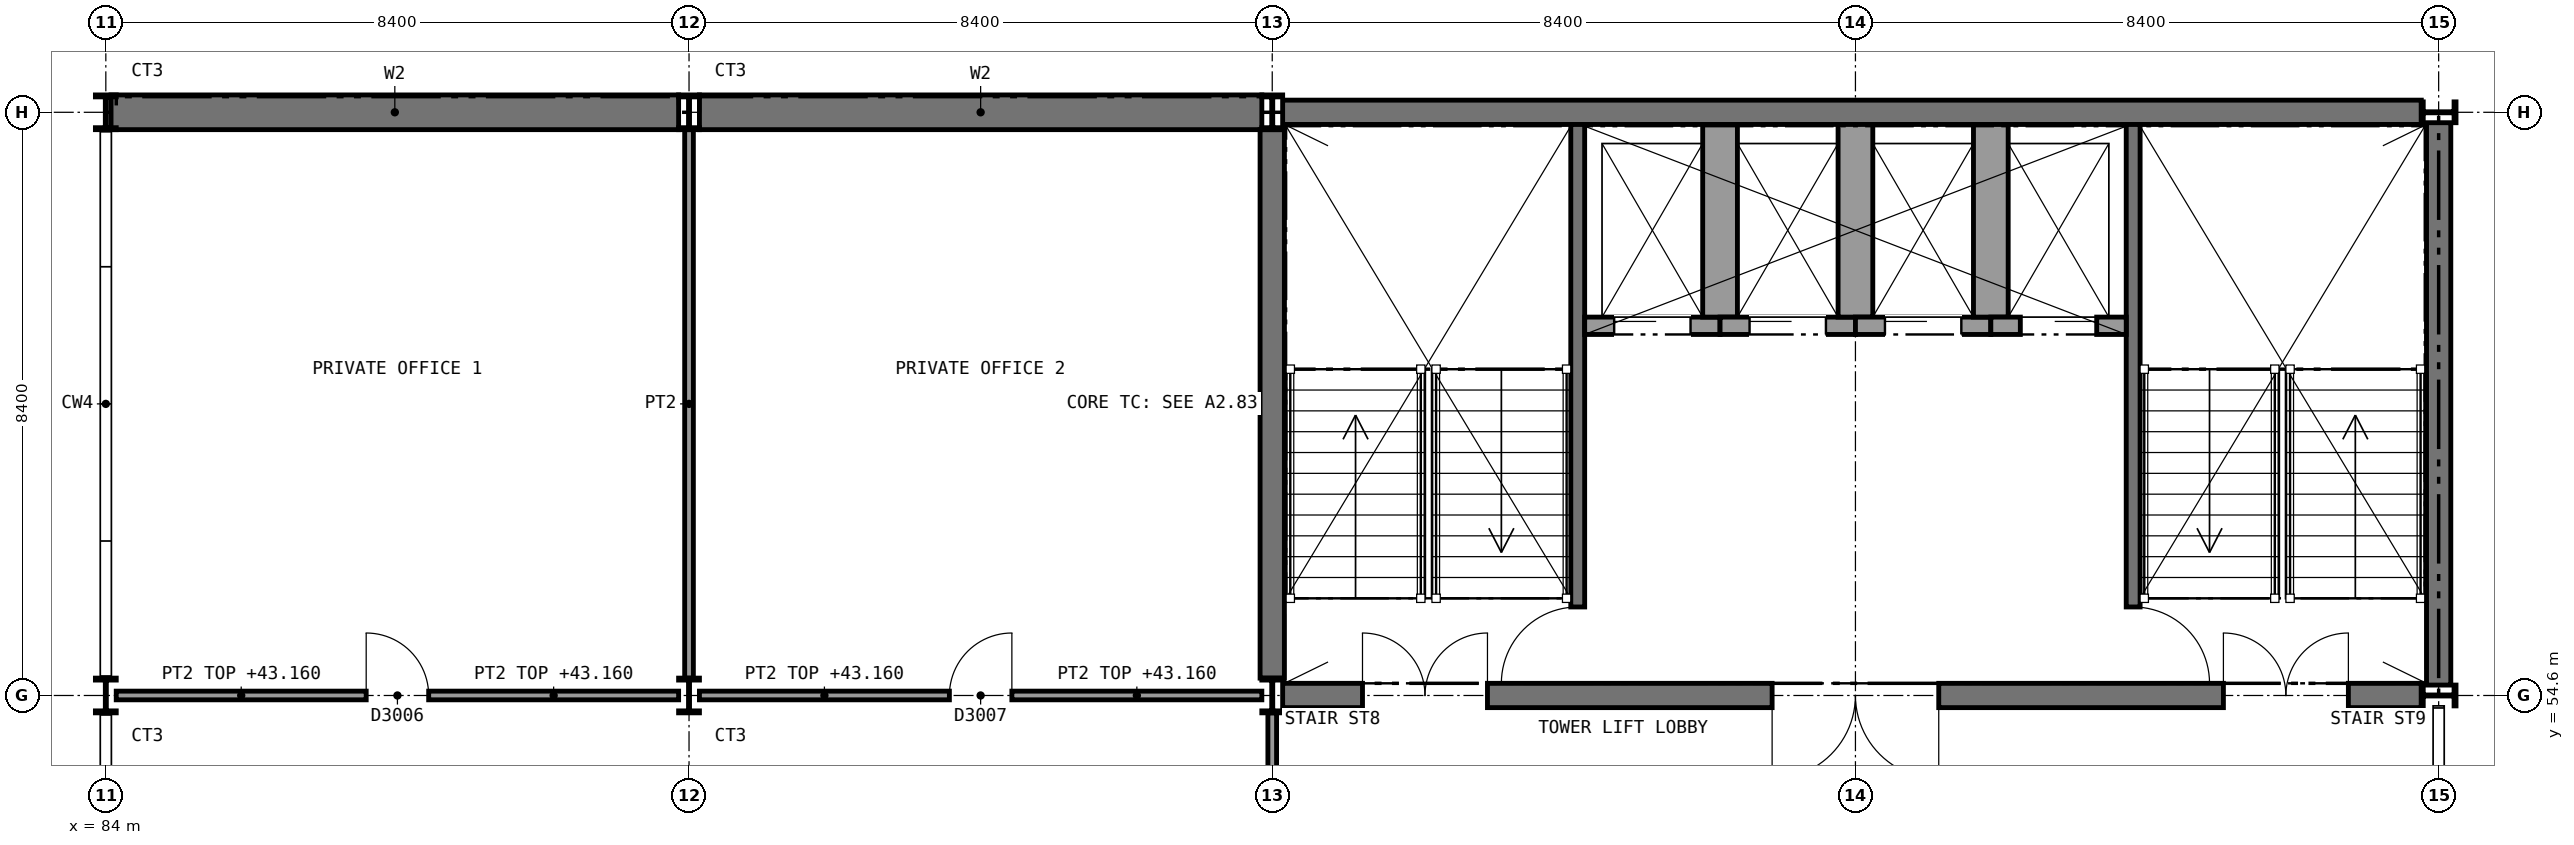
"""IFC4 building model, lengths in metres.
Left out: names, types, materials, properties, quantities, classifications, styles, units other than length and angle.
Written with IfcOpenShell. Run it as: python <this file> out.ifc"""

import sys

from ifc_helpers import new_model, si_unit, direction, frame, frame_2d, origin, origin_2d, place, context, subcontext, project, spatial, rectangle, i_section, extrude, element, fill, save


model = new_model("IFC4")
c1 = context("Model", 3, precision=1e-05, world=origin(), true_north=direction((0.0, 1.0)))
c2 = subcontext(c1, "Body", "Model", "MODEL_VIEW")
j1 = project(units=[si_unit("LENGTHUNIT", "METRE"), si_unit("PLANEANGLEUNIT", "RADIAN")], contexts=[c1])
p1 = place(None, origin())
s1 = spatial("IfcSite", under=j1, at=p1, CompositionType="ELEMENT")
p2 = place(p1, origin())
s2 = spatial("IfcBuilding", under=s1, at=p2, CompositionType="ELEMENT")
p3 = place(p2, frame((0.0, 0.0, 39.6)))
s3 = spatial("IfcBuildingStorey", under=s2, at=p3, CompositionType="ELEMENT", Elevation=39.6)
p4 = place(p3, frame((84.075, 63.0, 0.0), z_axis=(0.0, 0.0, 1.0), x_axis=(1.0, 0.0, 0.0)))
e1 = element("IfcWall", 1, at=p4, inside=s3, PredefinedType="SHEAR", context=c2, shape_type="SweptSolid", body=[
    extrude(rectangle(XDim=8.175, YDim=0.5, at=frame_2d((4.087, 0.0))), origin(), (0.0, 0.0, 1.0), 3.85),
])
p5 = place(p3, frame((92.55, 63.0, 0.0), z_axis=(0.0, 0.0, 1.0), x_axis=(1.0, 0.0, 0.0)))
e2 = element("IfcWall", 2, at=p5, inside=s3, PredefinedType="SHEAR", context=c2, shape_type="SweptSolid", body=[
    extrude(rectangle(XDim=8.1, YDim=0.5, at=frame_2d((4.05, 0.0))), origin(), (0.0, 0.0, 1.0), 3.85),
])
p6 = place(p3, frame((100.95, 63.0, 0.0), z_axis=(0.0, 0.0, 1.0), x_axis=(1.0, 0.0, 0.0)))
e3 = element("IfcWall", 3, at=p6, inside=s3, PredefinedType="SHEAR", context=c2, shape_type="SweptSolid", body=[
    extrude(rectangle(XDim=16.4, YDim=0.35, at=frame_2d((8.2, 0.0))), origin(), (0.0, 0.0, 1.0), 3.85),
])
p7 = place(p3, frame((100.95, 54.6, 0.0), z_axis=(0.0, 0.0, 1.0), x_axis=(1.0, 0.0, 0.0)))
e4 = element("IfcWall", 4, at=p7, inside=s3, PredefinedType="SHEAR", context=c2, shape_type="SweptSolid", body=[
    extrude(rectangle(XDim=16.4, YDim=0.35, at=frame_2d((8.2, 0.0))), origin(), (0.0, 0.0, 1.0), 3.85),
])
p8 = place(p7, frame((1.15, 0.0, 0.0)))
e5 = element("IfcOpeningElement", 5, at=p8, cuts=e4, PredefinedType="OPENING", context=c2, shape_type="SweptSolid", body=[
    extrude(rectangle(XDim=1.8, YDim=2.1, at=frame_2d((0.9, 1.05))), frame((0.0, 0.185, 0.0), z_axis=(0.0, -1.0, 0.0), x_axis=(1.0, 0.0, 0.0)), (0.0, 0.0, 1.0), 0.37),
])
p9 = place(p7, frame((13.55, 0.0, 0.0)))
e6 = element("IfcOpeningElement", 6, at=p9, cuts=e4, PredefinedType="OPENING", context=c2, shape_type="SweptSolid", body=[
    extrude(rectangle(XDim=1.8, YDim=2.1, at=frame_2d((0.9, 1.05))), frame((0.0, 0.185, 0.0), z_axis=(0.0, -1.0, 0.0), x_axis=(1.0, 0.0, 0.0)), (0.0, 0.0, 1.0), 0.37),
])
p10 = place(p7, frame((7.05, 0.0, 0.0)))
e7 = element("IfcOpeningElement", 7, at=p10, cuts=e4, PredefinedType="OPENING", context=c2, shape_type="SweptSolid", body=[
    extrude(rectangle(XDim=2.4, YDim=2.4, at=frame_2d((1.2, 1.2))), frame((0.0, 0.185, 0.0), z_axis=(0.0, -1.0, 0.0), x_axis=(1.0, 0.0, 0.0)), (0.0, 0.0, 1.0), 0.37),
])
p11 = place(p3, frame((100.8, 54.85, 0.0), z_axis=(0.0, 0.0, 1.0), x_axis=(0.0, 1.0, 0.0)))
e8 = element("IfcWall", 8, at=p11, inside=s3, PredefinedType="SHEAR", context=c2, shape_type="SweptSolid", body=[
    extrude(rectangle(XDim=7.9, YDim=0.35, at=frame_2d((3.95, 0.0))), origin(), (0.0, 0.0, 1.0), 3.85),
])
p12 = place(p3, frame((117.6, 54.75, 0.0), z_axis=(0.0, 0.0, 1.0), x_axis=(0.0, 1.0, 0.0)))
e9 = element("IfcWall", 9, at=p12, inside=s3, PredefinedType="SHEAR", context=c2, shape_type="SweptSolid", body=[
    extrude(rectangle(XDim=8.1, YDim=0.35, at=frame_2d((4.05, 0.0))), origin(), (0.0, 0.0, 1.0), 3.85),
])
for number, where, z_axis, x_axis in (
    (10, (84.0, 54.6, 0.0), (0.0, 0.0, 1.0), (1.0, 0.0, 0.0)),
    (11, (84.0, 63.0, 0.0), (0.0, 0.0, 1.0), (1.0, 0.0, 0.0)),
    (12, (92.4, 54.6, 0.0), (0.0, 0.0, 1.0), (1.0, 0.0, 0.0)),
    (13, (92.4, 63.0, 0.0), (0.0, 0.0, 1.0), (1.0, 0.0, 0.0)),
    (14, (100.8, 54.6, 0.0), (0.0, 0.0, 1.0), (1.0, 0.0, 0.0)),
    (15, (100.8, 63.0, 0.0), (0.0, 0.0, 1.0), (1.0, 0.0, 0.0)),
    (16, (117.6, 54.6, 0.0), (0.0, 0.0, 1.0), (0.0, 1.0, 0.0)),
    (17, (117.6, 63.0, 0.0), (0.0, 0.0, 1.0), (0.0, 1.0, 0.0)),
):
    element("IfcColumn", number, at=place(p3, frame(where, z_axis=z_axis, x_axis=x_axis)), inside=s3, PredefinedType="COLUMN", context=c2, shape_type="SweptSolid", body=[
        extrude(i_section(OverallWidth=0.3, OverallDepth=0.5, WebThickness=0.014, FlangeThickness=0.028, FilletRadius=0.027, at=origin_2d()), origin(), (0.0, 0.0, 1.0), 4.0),
    ])
p13 = place(p3, frame((100.8, 51.35, 0.0), z_axis=(0.0, 0.0, 1.0), x_axis=(0.0, 1.0, 0.0)))
e18 = element("IfcWall", 18, at=p13, inside=s3, PredefinedType="PARTITIONING", context=c2, shape_type="SweptSolid", body=[
    extrude(rectangle(XDim=3.0, YDim=0.125, at=frame_2d((1.5, 0.0))), origin(), (0.0, 0.0, 1.0), 3.5),
])
p14 = place(p3, frame((84.15, 54.6, 0.0), z_axis=(0.0, 0.0, 1.0), x_axis=(1.0, 0.0, 0.0)))
e19 = element("IfcWall", 19, at=p14, inside=s3, PredefinedType="PARTITIONING", context=c2, shape_type="SweptSolid", body=[
    extrude(rectangle(XDim=8.1, YDim=0.125, at=frame_2d((4.05, 0.0))), origin(), (0.0, 0.0, 1.0), 3.56),
])
p15 = place(p14, frame((3.6, 0.0, 0.0)))
e20 = element("IfcOpeningElement", 20, at=p15, cuts=e19, PredefinedType="OPENING", context=c2, shape_type="SweptSolid", body=[
    extrude(rectangle(XDim=0.9, YDim=2.1, at=frame_2d((0.45, 1.05))), frame((0.0, 0.073, 0.0), z_axis=(0.0, -1.0, 0.0), x_axis=(1.0, 0.0, 0.0)), (0.0, 0.0, 1.0), 0.145),
])
p16 = place(p3, frame((92.55, 54.6, 0.0), z_axis=(0.0, 0.0, 1.0), x_axis=(1.0, 0.0, 0.0)))
e21 = element("IfcWall", 21, at=p16, inside=s3, PredefinedType="PARTITIONING", context=c2, shape_type="SweptSolid", body=[
    extrude(rectangle(XDim=8.1, YDim=0.125, at=frame_2d((4.05, 0.0))), origin(), (0.0, 0.0, 1.0), 3.56),
])
p17 = place(p16, frame((3.6, 0.0, 0.0)))
e22 = element("IfcOpeningElement", 22, at=p17, cuts=e21, PredefinedType="OPENING", context=c2, shape_type="SweptSolid", body=[
    extrude(rectangle(XDim=0.9, YDim=2.1, at=frame_2d((0.45, 1.05))), frame((0.0, 0.073, 0.0), z_axis=(0.0, -1.0, 0.0), x_axis=(1.0, 0.0, 0.0)), (0.0, 0.0, 1.0), 0.145),
])
p18 = place(p3, frame((92.4, 54.85, 0.0), z_axis=(0.0, 0.0, 1.0), x_axis=(0.0, 1.0, 0.0)))
e23 = element("IfcWall", 23, at=p18, inside=s3, PredefinedType="PARTITIONING", context=c2, shape_type="SweptSolid", body=[
    extrude(rectangle(XDim=7.9, YDim=0.125, at=frame_2d((3.95, 0.0))), origin(), (0.0, 0.0, 1.0), 3.5),
])
p19 = place(p3, frame((105.2, 62.825, 0.0), z_axis=(0.0, 0.0, 1.0), x_axis=(0.0, -1.0, 0.0)))
e24 = element("IfcWall", 24, at=p19, inside=s3, PredefinedType="SHEAR", context=c2, shape_type="SweptSolid", body=[
    extrude(rectangle(XDim=8.05, YDim=0.2, at=frame_2d((4.025, 0.0))), origin(), (0.0, 0.0, 1.0), 3.85),
])
p20 = place(p19, frame((6.95, 0.0, 0.0)))
e25 = element("IfcOpeningElement", 25, at=p20, cuts=e24, PredefinedType="OPENING", context=c2, shape_type="SweptSolid", body=[
    extrude(rectangle(XDim=1.11, YDim=2.1, at=frame_2d((0.555, 1.05))), frame((0.0, 0.11, 0.0), z_axis=(0.0, -1.0, 0.0), x_axis=(1.0, 0.0, 0.0)), (0.0, 0.0, 1.0), 0.22),
])
p21 = place(p3, frame((113.2, 62.825, 0.0), z_axis=(0.0, 0.0, 1.0), x_axis=(0.0, -1.0, 0.0)))
e26 = element("IfcWall", 26, at=p21, inside=s3, PredefinedType="SHEAR", context=c2, shape_type="SweptSolid", body=[
    extrude(rectangle(XDim=8.05, YDim=0.2, at=frame_2d((4.025, 0.0))), origin(), (0.0, 0.0, 1.0), 3.85),
])
p22 = place(p21, frame((6.95, 0.0, 0.0)))
e27 = element("IfcOpeningElement", 27, at=p22, cuts=e26, PredefinedType="OPENING", context=c2, shape_type="SweptSolid", body=[
    extrude(rectangle(XDim=1.11, YDim=2.1, at=frame_2d((0.555, 1.05))), frame((0.0, 0.11, 0.0), z_axis=(0.0, -1.0, 0.0), x_axis=(1.0, 0.0, 0.0)), (0.0, 0.0, 1.0), 0.22),
])
p23 = place(p3, frame((105.3, 59.925, 0.0), z_axis=(0.0, 0.0, 1.0), x_axis=(1.0, 0.0, 0.0)))
e28 = element("IfcWall", 28, at=p23, inside=s3, PredefinedType="SOLIDWALL", context=c2, shape_type="SweptSolid", body=[
    extrude(rectangle(XDim=1.95, YDim=0.25, at=frame_2d((0.975, 0.0))), origin(), (0.0, 0.0, 1.0), 4.0),
])
p24 = place(p23, frame((0.425, 0.0, 0.0)))
e29 = element("IfcOpeningElement", 29, at=p24, cuts=e28, PredefinedType="OPENING", context=c2, shape_type="SweptSolid", body=[
    extrude(rectangle(XDim=1.1, YDim=2.1, at=frame_2d((0.55, 1.05))), frame((0.0, 0.135, 0.0), z_axis=(0.0, -1.0, 0.0), x_axis=(1.0, 0.0, 0.0)), (0.0, 0.0, 1.0), 0.27),
])
p25 = place(p3, frame((107.25, 62.825, 0.0), z_axis=(0.0, 0.0, 1.0), x_axis=(0.0, -1.0, 0.0)))
e30 = element("IfcWall", 30, at=p25, inside=s3, PredefinedType="SOLIDWALL", context=c2, shape_type="SweptSolid", body=[
    extrude(rectangle(XDim=2.775, YDim=0.5, at=frame_2d((1.387, 0.0))), origin(), (0.0, 0.0, 1.0), 4.0),
])
p26 = place(p3, frame((107.25, 59.925, 0.0), z_axis=(0.0, 0.0, 1.0), x_axis=(1.0, 0.0, 0.0)))
e31 = element("IfcWall", 31, at=p26, inside=s3, PredefinedType="SOLIDWALL", context=c2, shape_type="SweptSolid", body=[
    extrude(rectangle(XDim=1.95, YDim=0.25, at=frame_2d((0.975, 0.0))), origin(), (0.0, 0.0, 1.0), 4.0),
])
p27 = place(p26, frame((0.425, 0.0, 0.0)))
e32 = element("IfcOpeningElement", 32, at=p27, cuts=e31, PredefinedType="OPENING", context=c2, shape_type="SweptSolid", body=[
    extrude(rectangle(XDim=1.1, YDim=2.1, at=frame_2d((0.55, 1.05))), frame((0.0, 0.135, 0.0), z_axis=(0.0, -1.0, 0.0), x_axis=(1.0, 0.0, 0.0)), (0.0, 0.0, 1.0), 0.27),
])
p28 = place(p3, frame((109.2, 62.825, 0.0), z_axis=(0.0, 0.0, 1.0), x_axis=(0.0, -1.0, 0.0)))
e33 = element("IfcWall", 33, at=p28, inside=s3, PredefinedType="SOLIDWALL", context=c2, shape_type="SweptSolid", body=[
    extrude(rectangle(XDim=2.775, YDim=0.5, at=frame_2d((1.387, 0.0))), origin(), (0.0, 0.0, 1.0), 4.0),
])
p29 = place(p3, frame((109.2, 59.925, 0.0), z_axis=(0.0, 0.0, 1.0), x_axis=(1.0, 0.0, 0.0)))
e34 = element("IfcWall", 34, at=p29, inside=s3, PredefinedType="SOLIDWALL", context=c2, shape_type="SweptSolid", body=[
    extrude(rectangle(XDim=1.95, YDim=0.25, at=frame_2d((0.975, 0.0))), origin(), (0.0, 0.0, 1.0), 4.0),
])
p30 = place(p29, frame((0.425, 0.0, 0.0)))
e35 = element("IfcOpeningElement", 35, at=p30, cuts=e34, PredefinedType="OPENING", context=c2, shape_type="SweptSolid", body=[
    extrude(rectangle(XDim=1.1, YDim=2.1, at=frame_2d((0.55, 1.05))), frame((0.0, 0.135, 0.0), z_axis=(0.0, -1.0, 0.0), x_axis=(1.0, 0.0, 0.0)), (0.0, 0.0, 1.0), 0.27),
])
p31 = place(p3, frame((111.15, 62.825, 0.0), z_axis=(0.0, 0.0, 1.0), x_axis=(0.0, -1.0, 0.0)))
e36 = element("IfcWall", 36, at=p31, inside=s3, PredefinedType="SOLIDWALL", context=c2, shape_type="SweptSolid", body=[
    extrude(rectangle(XDim=2.775, YDim=0.5, at=frame_2d((1.387, 0.0))), origin(), (0.0, 0.0, 1.0), 4.0),
])
p32 = place(p3, frame((111.15, 59.925, 0.0), z_axis=(0.0, 0.0, 1.0), x_axis=(1.0, 0.0, 0.0)))
e37 = element("IfcWall", 37, at=p32, inside=s3, PredefinedType="SOLIDWALL", context=c2, shape_type="SweptSolid", body=[
    extrude(rectangle(XDim=1.95, YDim=0.25, at=frame_2d((0.975, 0.0))), origin(), (0.0, 0.0, 1.0), 4.0),
])
p33 = place(p32, frame((0.425, 0.0, 0.0)))
e38 = element("IfcOpeningElement", 38, at=p33, cuts=e37, PredefinedType="OPENING", context=c2, shape_type="SweptSolid", body=[
    extrude(rectangle(XDim=1.1, YDim=2.1, at=frame_2d((0.55, 1.05))), frame((0.0, 0.135, 0.0), z_axis=(0.0, -1.0, 0.0), x_axis=(1.0, 0.0, 0.0)), (0.0, 0.0, 1.0), 0.27),
])
p34 = place(p15, origin())
e39 = element("IfcDoor", 39, at=p34, inside=s3, OperationType="SINGLE_SWING_LEFT", PredefinedType="DOOR", context=c2, shape_type="SweptSolid", body=[
    extrude(rectangle(XDim=0.9, YDim=2.1, at=frame_2d((0.45, 1.05))), frame((0.0, 0.025, 0.0), z_axis=(0.0, -1.0, 0.0), x_axis=(1.0, 0.0, 0.0)), (0.0, 0.0, 1.0), 0.05),
])
fill(e20, e39)
p35 = place(p17, origin())
e40 = element("IfcDoor", 40, at=p35, inside=s3, OperationType="SINGLE_SWING_RIGHT", PredefinedType="DOOR", context=c2, shape_type="SweptSolid", body=[
    extrude(rectangle(XDim=0.9, YDim=2.1, at=frame_2d((0.45, 1.05))), frame((0.0, 0.025, 0.0), z_axis=(0.0, -1.0, 0.0), x_axis=(1.0, 0.0, 0.0)), (0.0, 0.0, 1.0), 0.05),
])
fill(e22, e40)
p36 = place(p20, frame((1.1, 0.0, 0.0), z_axis=(0.0, 0.0, 1.0), x_axis=(-1.0, 0.0, 0.0)))
e41 = element("IfcDoor", 41, at=p36, inside=s3, OperationType="SINGLE_SWING_LEFT", PredefinedType="DOOR", context=c2, shape_type="SweptSolid", body=[
    extrude(rectangle(XDim=1.1, YDim=2.1, at=frame_2d((0.55, 1.05))), frame((0.0, 0.025, 0.0), z_axis=(0.0, -1.0, 0.0), x_axis=(1.0, 0.0, 0.0)), (0.0, 0.0, 1.0), 0.05),
])
fill(e25, e41)
p37 = place(p22, origin())
e42 = element("IfcDoor", 42, at=p37, inside=s3, OperationType="SINGLE_SWING_RIGHT", PredefinedType="DOOR", context=c2, shape_type="SweptSolid", body=[
    extrude(rectangle(XDim=1.1, YDim=2.1, at=frame_2d((0.55, 1.05))), frame((0.0, 0.025, 0.0), z_axis=(0.0, -1.0, 0.0), x_axis=(1.0, 0.0, 0.0)), (0.0, 0.0, 1.0), 0.05),
])
fill(e27, e42)
p38 = place(p24, frame((1.1, 0.0, 0.0), z_axis=(0.0, 0.0, 1.0), x_axis=(-1.0, 0.0, 0.0)))
e43 = element("IfcDoor", 43, at=p38, inside=s3, OperationType="SLIDING_TO_RIGHT", PredefinedType="DOOR", context=c2, shape_type="SweptSolid", body=[
    extrude(rectangle(XDim=1.1, YDim=2.1, at=frame_2d((0.55, 1.05))), frame((0.0, 0.025, 0.0), z_axis=(0.0, -1.0, 0.0), x_axis=(1.0, 0.0, 0.0)), (0.0, 0.0, 1.0), 0.05),
])
fill(e29, e43)
p39 = place(p27, frame((1.1, 0.0, 0.0), z_axis=(0.0, 0.0, 1.0), x_axis=(-1.0, 0.0, 0.0)))
e44 = element("IfcDoor", 44, at=p39, inside=s3, OperationType="SLIDING_TO_RIGHT", PredefinedType="DOOR", context=c2, shape_type="SweptSolid", body=[
    extrude(rectangle(XDim=1.1, YDim=2.1, at=frame_2d((0.55, 1.05))), frame((0.0, 0.025, 0.0), z_axis=(0.0, -1.0, 0.0), x_axis=(1.0, 0.0, 0.0)), (0.0, 0.0, 1.0), 0.05),
])
fill(e32, e44)
p40 = place(p30, frame((1.1, 0.0, 0.0), z_axis=(0.0, 0.0, 1.0), x_axis=(-1.0, 0.0, 0.0)))
e45 = element("IfcDoor", 45, at=p40, inside=s3, OperationType="SLIDING_TO_RIGHT", PredefinedType="DOOR", context=c2, shape_type="SweptSolid", body=[
    extrude(rectangle(XDim=1.1, YDim=2.1, at=frame_2d((0.55, 1.05))), frame((0.0, 0.025, 0.0), z_axis=(0.0, -1.0, 0.0), x_axis=(1.0, 0.0, 0.0)), (0.0, 0.0, 1.0), 0.05),
])
fill(e35, e45)
p41 = place(p33, frame((1.1, 0.0, 0.0), z_axis=(0.0, 0.0, 1.0), x_axis=(-1.0, 0.0, 0.0)))
e46 = element("IfcDoor", 46, at=p41, inside=s3, OperationType="SLIDING_TO_LEFT", PredefinedType="DOOR", context=c2, shape_type="SweptSolid", body=[
    extrude(rectangle(XDim=1.1, YDim=2.1, at=frame_2d((0.55, 1.05))), frame((0.0, 0.025, 0.0), z_axis=(0.0, -1.0, 0.0), x_axis=(1.0, 0.0, 0.0)), (0.0, 0.0, 1.0), 0.05),
])
fill(e38, e46)
p42 = place(p8, origin())
e47 = element("IfcDoor", 47, at=p42, inside=s3, OperationType="DOUBLE_DOOR_SINGLE_SWING", PredefinedType="DOOR", context=c2, shape_type="SweptSolid", body=[
    extrude(rectangle(XDim=1.8, YDim=2.1, at=frame_2d((0.9, 1.05))), frame((0.0, 0.025, 0.0), z_axis=(0.0, -1.0, 0.0), x_axis=(1.0, 0.0, 0.0)), (0.0, 0.0, 1.0), 0.05),
])
fill(e5, e47)
p43 = place(p9, origin())
e48 = element("IfcDoor", 48, at=p43, inside=s3, OperationType="DOUBLE_DOOR_SINGLE_SWING", PredefinedType="DOOR", context=c2, shape_type="SweptSolid", body=[
    extrude(rectangle(XDim=1.8, YDim=2.1, at=frame_2d((0.9, 1.05))), frame((0.0, 0.025, 0.0), z_axis=(0.0, -1.0, 0.0), x_axis=(1.0, 0.0, 0.0)), (0.0, 0.0, 1.0), 0.05),
])
fill(e6, e48)
p44 = place(p10, frame((2.4, 0.0, 0.0), z_axis=(0.0, 0.0, 1.0), x_axis=(-1.0, 0.0, 0.0)))
e49 = element("IfcDoor", 49, at=p44, inside=s3, OperationType="DOUBLE_DOOR_SINGLE_SWING", PredefinedType="DOOR", context=c2, shape_type="SweptSolid", body=[
    extrude(rectangle(XDim=2.4, YDim=2.4, at=frame_2d((1.2, 1.2))), frame((0.0, 0.025, 0.0), z_axis=(0.0, -1.0, 0.0), x_axis=(1.0, 0.0, 0.0)), (0.0, 0.0, 1.0), 0.05),
])
fill(e7, e49)
save(model, sys.argv[1])
